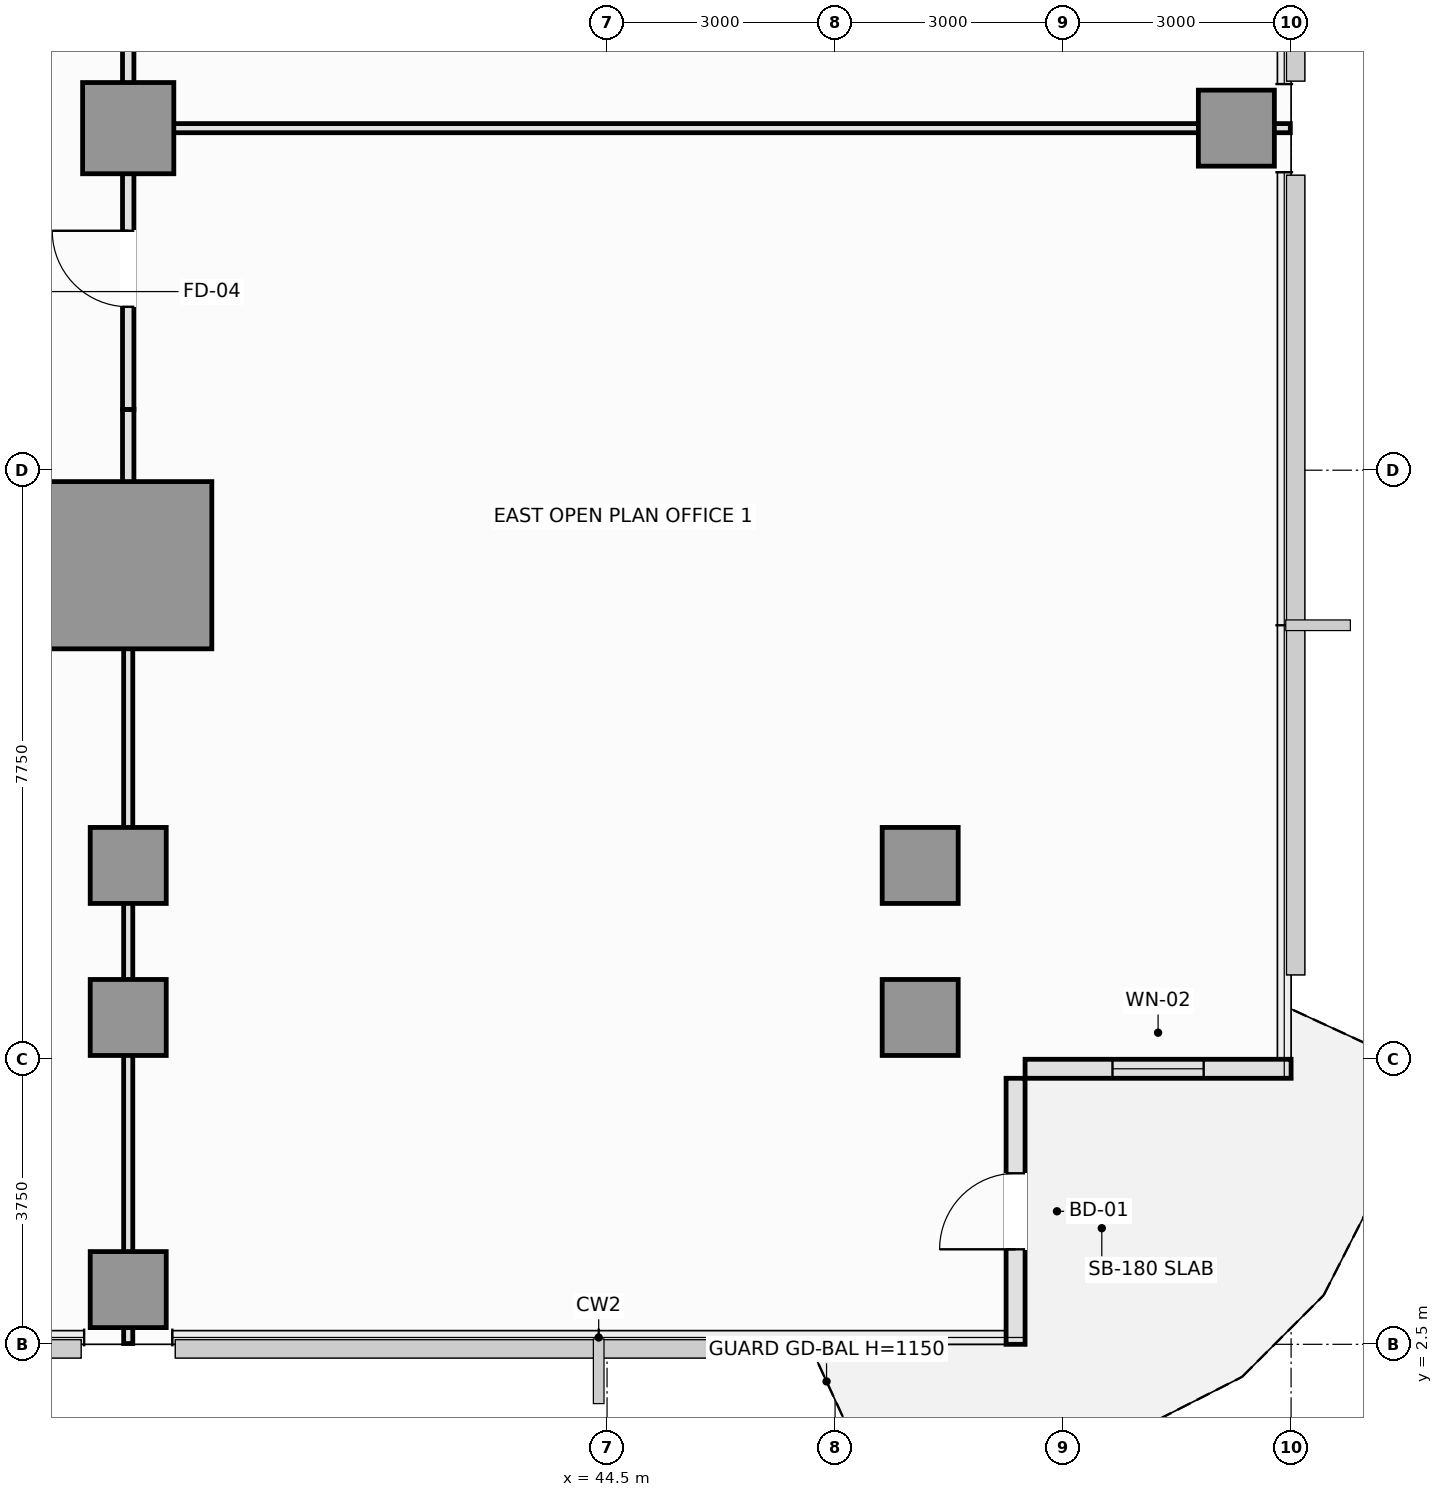
"""IFC4 building model, lengths in metres.
Left out: names, types, materials, properties, quantities, classifications, styles, units other than length and angle.
Written with IfcOpenShell. Run it as: python <this file> out.ifc"""

import sys

from ifc_helpers import new_model, si_unit, direction, frame, frame_2d, origin, origin_2d, place, context, subcontext, project, spatial, rectangle, extrude, element, fill, save


model = new_model("IFC4")
c1 = context("Model", 3, precision=1e-05, world=origin(), true_north=direction((0.0, 1.0)))
c2 = subcontext(c1, "Body", "Model", "MODEL_VIEW")
j1 = project(units=[si_unit("LENGTHUNIT", "METRE"), si_unit("PLANEANGLEUNIT", "RADIAN")], contexts=[c1])
p1 = place(None, origin())
s1 = spatial("IfcSite", under=j1, at=p1, CompositionType="ELEMENT")
p2 = place(p1, origin())
s2 = spatial("IfcBuilding", under=s1, at=p2, CompositionType="ELEMENT")
p3 = place(p2, frame((0.0, 0.0, 78.85)))
s3 = spatial("IfcBuildingStorey", under=s2, at=p3, CompositionType="ELEMENT", Elevation=78.85)
p4 = place(p3, frame((38.2, 12.75, 0.0), z_axis=(0.0, 0.0, 1.0), x_axis=(1.0, 0.0, 0.0)))
e1 = element("IfcColumn", 1, at=p4, inside=s3, PredefinedType="COLUMN", context=c2, shape_type="SweptSolid", body=[
    extrude(rectangle(XDim=2.2, YDim=2.2, at=origin_2d()), origin(), (0.0, 0.0, 1.0), 3.55),
])
p5 = place(p3, frame((38.2, 18.5, 0.0), z_axis=(0.0, 0.0, 1.0), x_axis=(1.0, 0.0, 0.0)))
e2 = element("IfcColumn", 2, at=p5, inside=s3, PredefinedType="COLUMN", context=c2, shape_type="SweptSolid", body=[
    extrude(rectangle(XDim=1.2, YDim=1.2, at=origin_2d()), origin(), (0.0, 0.0, 1.0), 3.55),
])
for number, where, z_axis, x_axis in (
    (3, (48.62, 6.8, 0.0), (0.0, 0.0, 1.0), (1.0, 0.0, 0.0)),
    (4, (38.2, 6.8, 0.0), (0.0, 0.0, 1.0), (1.0, 0.0, 0.0)),
    (5, (38.2, 8.8, 0.0), (0.0, 0.0, 1.0), (1.0, 0.0, 0.0)),
    (6, (48.62, 8.8, 0.0), (0.0, 0.0, 1.0), (1.0, 0.0, 0.0)),
    (7, (52.78, 18.5, 0.0), (0.0, 0.0, 1.0), (1.0, 0.0, 0.0)),
    (8, (38.2, 3.22, 0.0), (0.0, 0.0, 1.0), (1.0, 0.0, 0.0)),
):
    element("IfcColumn", number, at=place(p3, frame(where, z_axis=z_axis, x_axis=x_axis)), inside=s3, PredefinedType="COLUMN", context=c2, shape_type="SweptSolid", body=[
        extrude(rectangle(XDim=1.0, YDim=1.0, at=origin_2d()), origin(), (0.0, 0.0, 1.0), 3.55),
    ])
p6 = place(p3, frame((49.875, 2.5, 0.0), z_axis=(0.0, 0.0, 1.0), x_axis=(0.0, 1.0, 0.0)))
e9 = element("IfcWall", 9, at=p6, inside=s3, PredefinedType="SOLIDWALL", context=c2, shape_type="SweptSolid", body=[
    extrude(rectangle(XDim=3.5, YDim=0.25, at=frame_2d((1.75, 0.0))), origin(), (0.0, 0.0, 1.0), 3.07),
])
p7 = place(p6, frame((1.25, 0.0, 0.0)))
e10 = element("IfcOpeningElement", 10, at=p7, cuts=e9, PredefinedType="OPENING", context=c2, shape_type="SweptSolid", body=[
    extrude(rectangle(XDim=1.0, YDim=2.2, at=frame_2d((0.5, 1.1))), frame((0.0, 0.135, 0.0), z_axis=(0.0, -1.0, 0.0), x_axis=(1.0, 0.0, 0.0)), (0.0, 0.0, 1.0), 0.27),
])
p8 = place(p3, frame((50.0, 6.125, 0.0), z_axis=(0.0, 0.0, 1.0), x_axis=(1.0, 0.0, 0.0)))
e11 = element("IfcWall", 11, at=p8, inside=s3, PredefinedType="SOLIDWALL", context=c2, shape_type="SweptSolid", body=[
    extrude(rectangle(XDim=3.5, YDim=0.25, at=frame_2d((1.75, 0.0))), origin(), (0.0, 0.0, 1.0), 3.07),
])
p9 = place(p8, frame((1.15, 0.0, 0.9)))
e12 = element("IfcOpeningElement", 12, at=p9, cuts=e11, PredefinedType="OPENING", context=c2, shape_type="SweptSolid", body=[
    extrude(rectangle(XDim=1.2, YDim=1.8, at=frame_2d((0.6, 0.9))), frame((0.0, 0.135, 0.0), z_axis=(0.0, -1.0, 0.0), x_axis=(1.0, 0.0, 0.0)), (0.0, 0.0, 1.0), 0.27),
])
p10 = place(p3, frame((30.8, 12.9, 0.0), z_axis=(0.0, 0.0, 1.0), x_axis=(1.0, 0.0, 0.0)))
e13 = element("IfcWall", 13, at=p10, inside=s3, PredefinedType="PARTITIONING", context=c2, shape_type="SweptSolid", body=[
    extrude(rectangle(XDim=7.4, YDim=0.15, at=frame_2d((3.7, 0.0))), origin(), (0.0, 0.0, 1.0), 2.72),
])
p11 = place(p10, frame((3.2, 0.0, 0.0)))
e14 = element("IfcOpeningElement", 14, at=p11, cuts=e13, PredefinedType="OPENING", context=c2, shape_type="SweptSolid", body=[
    extrude(rectangle(XDim=1.0, YDim=2.15, at=frame_2d((0.5, 1.075))), frame((0.0, 0.085, 0.0), z_axis=(0.0, -1.0, 0.0), x_axis=(1.0, 0.0, 0.0)), (0.0, 0.0, 1.0), 0.17),
])
p12 = place(p3, frame((38.2, 12.9, 0.0), z_axis=(0.0, 0.0, 1.0), x_axis=(0.0, 1.0, 0.0)))
e15 = element("IfcWall", 15, at=p12, inside=s3, PredefinedType="PARTITIONING", context=c2, shape_type="SweptSolid", body=[
    extrude(rectangle(XDim=1.9, YDim=0.15, at=frame_2d((0.95, 0.0))), origin(), (0.0, 0.0, 1.0), 2.82),
])
p13 = place(p3, frame((38.2, 14.8, 0.0), z_axis=(0.0, 0.0, 1.0), x_axis=(0.0, 1.0, 0.0)))
e16 = element("IfcWall", 16, at=p13, inside=s3, PredefinedType="PARTITIONING", context=c2, shape_type="SweptSolid", body=[
    extrude(rectangle(XDim=3.7, YDim=0.15, at=frame_2d((1.85, 0.0))), origin(), (0.0, 0.0, 1.0), 2.82),
])
p14 = place(p13, frame((1.35, 0.0, 0.0)))
e17 = element("IfcOpeningElement", 17, at=p14, cuts=e16, PredefinedType="OPENING", context=c2, shape_type="SweptSolid", body=[
    extrude(rectangle(XDim=1.0, YDim=2.15, at=frame_2d((0.5, 1.075))), frame((0.0, 0.085, 0.0), z_axis=(0.0, -1.0, 0.0), x_axis=(1.0, 0.0, 0.0)), (0.0, 0.0, 1.0), 0.17),
])
p15 = place(p3, frame((38.2, 18.5, 0.0), z_axis=(0.0, 0.0, 1.0), x_axis=(0.0, 1.0, 0.0)))
e18 = element("IfcWall", 18, at=p15, inside=s3, PredefinedType="PARTITIONING", context=c2, shape_type="SweptSolid", body=[
    extrude(rectangle(XDim=4.5, YDim=0.15, at=frame_2d((2.25, 0.0))), origin(), (0.0, 0.0, 1.0), 2.82),
])
p16 = place(p15, frame((1.75, 0.0, 0.0)))
e19 = element("IfcOpeningElement", 19, at=p16, cuts=e18, PredefinedType="OPENING", context=c2, shape_type="SweptSolid", body=[
    extrude(rectangle(XDim=1.0, YDim=2.15, at=frame_2d((0.5, 1.075))), frame((0.0, 0.085, 0.0), z_axis=(0.0, -1.0, 0.0), x_axis=(1.0, 0.0, 0.0)), (0.0, 0.0, 1.0), 0.17),
])
p17 = place(p3, frame((38.2, 2.51, 0.0), z_axis=(0.0, 0.0, 1.0), x_axis=(0.0, 1.0, 0.0)))
e20 = element("IfcWall", 20, at=p17, inside=s3, PredefinedType="PARTITIONING", context=c2, shape_type="SweptSolid", body=[
    extrude(rectangle(XDim=10.39, YDim=0.12, at=frame_2d((5.195, 0.0))), origin(), (0.0, 0.0, 1.0), 2.82),
])
p18 = place(p3, frame((38.2, 18.5, 0.0), z_axis=(0.0, 0.0, 1.0), x_axis=(1.0, 0.0, 0.0)))
e21 = element("IfcWall", 21, at=p18, inside=s3, PredefinedType="PARTITIONING", context=c2, shape_type="SweptSolid", body=[
    extrude(rectangle(XDim=15.29, YDim=0.12, at=frame_2d((7.645, 0.0))), origin(), (0.0, 0.0, 1.0), 2.72),
])
p19 = place(p7, frame((1.0, 0.0, 0.0), z_axis=(0.0, 0.0, 1.0), x_axis=(-1.0, 0.0, 0.0)))
e22 = element("IfcDoor", 22, at=p19, inside=s3, OperationType="SINGLE_SWING_LEFT", PredefinedType="DOOR", context=c2, shape_type="SweptSolid", body=[
    extrude(rectangle(XDim=1.0, YDim=2.2, at=frame_2d((0.5, 1.1))), frame((0.0, 0.025, 0.0), z_axis=(0.0, -1.0, 0.0), x_axis=(1.0, 0.0, 0.0)), (0.0, 0.0, 1.0), 0.05),
])
fill(e10, e22)
p20 = place(p9, origin())
e23 = element("IfcWindow", 23, at=p20, inside=s3, PartitioningType="SINGLE_PANEL", PredefinedType="WINDOW", context=c2, shape_type="SweptSolid", body=[
    extrude(rectangle(XDim=1.2, YDim=1.8, at=frame_2d((0.6, 0.9))), frame((0.0, 0.03, 0.0), z_axis=(0.0, -1.0, 0.0), x_axis=(1.0, 0.0, 0.0)), (0.0, 0.0, 1.0), 0.06),
])
fill(e12, e23)
p21 = place(p14, origin())
e24 = element("IfcDoor", 24, at=p21, inside=s3, OperationType="SINGLE_SWING_RIGHT", PredefinedType="DOOR", context=c2, shape_type="SweptSolid", body=[
    extrude(rectangle(XDim=1.0, YDim=2.15, at=frame_2d((0.5, 1.075))), frame((0.0, 0.025, 0.0), z_axis=(0.0, -1.0, 0.0), x_axis=(1.0, 0.0, 0.0)), (0.0, 0.0, 1.0), 0.05),
])
fill(e17, e24)
save(model, sys.argv[1])
